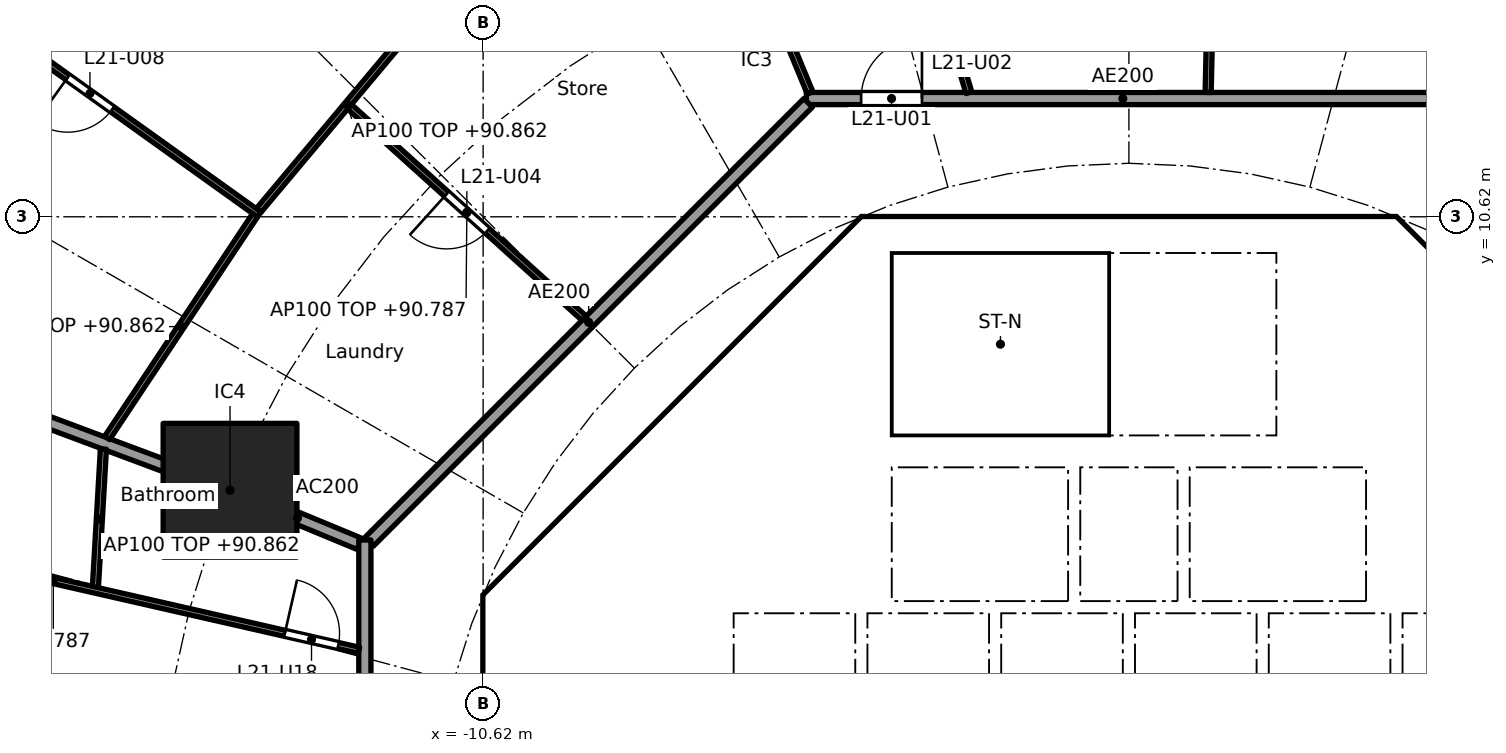
"""IFC4 building model, lengths in metres.
Left out: names, types, materials, properties, quantities, classifications, styles, units other than length and angle.
Written with IfcOpenShell. Run it as: python <this file> out.ifc"""

import sys

from ifc_helpers import new_model, si_unit, direction, frame, frame_2d, origin, origin_2d, place, context, subcontext, project, spatial, polyline, rectangle, outline, extrude, element, fill, save


model = new_model("IFC4")
c1 = context("Model", 3, precision=1e-05, world=origin(), true_north=direction((0.0, 1.0)))
c2 = subcontext(c1, "Body", "Model", "MODEL_VIEW")
j1 = project(units=[si_unit("LENGTHUNIT", "METRE"), si_unit("PLANEANGLEUNIT", "RADIAN")], contexts=[c1])
p1 = place(None, origin())
s1 = spatial("IfcSite", under=j1, at=p1, CompositionType="ELEMENT")
p2 = place(p1, origin())
s2 = spatial("IfcBuilding", under=s1, at=p2, CompositionType="ELEMENT")
p3 = place(p2, frame((0.0, 0.0, 88.1)))
s3 = spatial("IfcBuildingStorey", under=s2, at=p3, CompositionType="ELEMENT", Elevation=88.1)
p4 = place(p3, frame((-14.782, 6.123, 0.0), z_axis=(0.0, 0.0, 1.0), x_axis=(1.0, 0.0, 0.0)))
e1 = element("IfcColumn", 1, at=p4, inside=s3, PredefinedType="COLUMN", context=c2, shape_type="SweptSolid", body=[
    extrude(rectangle(XDim=2.2, YDim=2.2, at=origin_2d()), origin(), (0.0, 0.0, 1.0), 3.7),
])
p5 = place(p3, frame((9.988, 4.613, 0.0), z_axis=(0.0, 0.0, 1.0), x_axis=(-0.707106781187, 0.707106781187, 0.0)))
e2 = element("IfcWall", 2, at=p5, inside=s3, PredefinedType="SHEAR", context=c2, shape_type="SweptSolid", body=[
    extrude(rectangle(XDim=7.602, YDim=0.6, at=frame_2d((3.801, 0.0))), origin(), (0.0, 0.0, 1.0), 3.44),
])
p6 = place(p5, frame((3.201, 0.0, 0.0)))
e3 = element("IfcOpeningElement", 3, at=p6, cuts=e2, PredefinedType="OPENING", context=c2, shape_type="SweptSolid", body=[
    extrude(rectangle(XDim=1.2, YDim=2.1, at=frame_2d((0.6, 1.05))), frame((0.0, 0.31, 0.0), z_axis=(0.0, -1.0, 0.0), x_axis=(1.0, 0.0, 0.0)), (0.0, 0.0, 1.0), 0.62),
])
p7 = place(p3, frame((-4.613, 9.988, 0.0), z_axis=(0.0, 0.0, 1.0), x_axis=(-0.707106781187, -0.707106781187, 0.0)))
e4 = element("IfcWall", 4, at=p7, inside=s3, PredefinedType="SHEAR", context=c2, shape_type="SweptSolid", body=[
    extrude(rectangle(XDim=7.602, YDim=0.6, at=frame_2d((3.801, 0.0))), origin(), (0.0, 0.0, 1.0), 3.44),
])
p8 = place(p7, frame((0.351, 0.0, 0.0)))
e5 = element("IfcOpeningElement", 5, at=p8, cuts=e4, PredefinedType="OPENING", context=c2, shape_type="SweptSolid", body=[
    extrude(rectangle(XDim=1.1, YDim=2.1, at=frame_2d((0.55, 1.05))), frame((0.0, 0.31, 0.0), z_axis=(0.0, -1.0, 0.0), x_axis=(1.0, 0.0, 0.0)), (0.0, 0.0, 1.0), 0.62),
])
p9 = place(p3, frame((-10.325, 3.801, 0.0), z_axis=(0.0, 0.0, 1.0), x_axis=(0.0, -1.0, 0.0)))
e6 = element("IfcWall", 6, at=p9, inside=s3, PredefinedType="SHEAR", context=c2, shape_type="SweptSolid", body=[
    extrude(rectangle(XDim=7.602, YDim=0.6, at=frame_2d((3.801, 0.0))), origin(), (0.0, 0.0, 1.0), 3.44),
])
p10 = place(p9, frame((0.651, 0.0, 0.0)))
e7 = element("IfcOpeningElement", 7, at=p10, cuts=e6, PredefinedType="OPENING", context=c2, shape_type="SweptSolid", body=[
    extrude(rectangle(XDim=1.5, YDim=2.1, at=frame_2d((0.75, 1.05))), frame((0.0, 0.31, 0.0), z_axis=(0.0, -1.0, 0.0), x_axis=(1.0, 0.0, 0.0)), (0.0, 0.0, 1.0), 0.62),
])
p11 = place(p9, frame((5.451, 0.0, 0.0)))
e8 = element("IfcOpeningElement", 8, at=p11, cuts=e6, PredefinedType="OPENING", context=c2, shape_type="SweptSolid", body=[
    extrude(rectangle(XDim=1.5, YDim=2.1, at=frame_2d((0.75, 1.05))), frame((0.0, 0.31, 0.0), z_axis=(0.0, -1.0, 0.0), x_axis=(1.0, 0.0, 0.0)), (0.0, 0.0, 1.0), 0.62),
])
p12 = place(p3, frame((-5.8, 4.3, 0.0), z_axis=(0.0, 0.0, 1.0), x_axis=(0.0, 1.0, 0.0)))
e9 = element("IfcWall", 9, at=p12, inside=s3, PredefinedType="PARTITIONING", context=c2, shape_type="SweptSolid", body=[
    extrude(rectangle(XDim=3.927, YDim=0.15, at=frame_2d((1.963, 0.0))), origin(), (0.0, 0.0, 1.0), 3.44),
])
p13 = place(p12, frame((1.551, 0.0, 0.0)))
e10 = element("IfcOpeningElement", 10, at=p13, cuts=e9, PredefinedType="OPENING", context=c2, shape_type="SweptSolid", body=[
    extrude(rectangle(XDim=0.9, YDim=2.1, at=frame_2d((0.45, 1.05))), frame((0.0, 0.085, 0.0), z_axis=(0.0, -1.0, 0.0), x_axis=(1.0, 0.0, 0.0)), (0.0, 0.0, 1.0), 0.17),
])
p14 = place(p3, frame((4.0, 4.3, 0.0), z_axis=(0.0, 0.0, 1.0), x_axis=(0.0, 1.0, 0.0)))
e11 = element("IfcWall", 11, at=p14, inside=s3, PredefinedType="SOLIDWALL", context=c2, shape_type="SweptSolid", body=[
    extrude(rectangle(XDim=2.2, YDim=0.2, at=frame_2d((1.1, 0.0))), origin(), (0.0, 0.0, 1.0), 3.44),
])
p15 = place(p14, frame((0.55, 0.0, 0.0)))
e12 = element("IfcOpeningElement", 12, at=p15, cuts=e11, PredefinedType="OPENING", context=c2, shape_type="SweptSolid", body=[
    extrude(rectangle(XDim=1.1, YDim=2.1, at=frame_2d((0.55, 1.05))), frame((0.0, 0.11, 0.0), z_axis=(0.0, -1.0, 0.0), x_axis=(1.0, 0.0, 0.0)), (0.0, 0.0, 1.0), 0.22),
])
p16 = place(p3, frame((-4.0, 4.3, 0.0), z_axis=(0.0, 0.0, 1.0), x_axis=(0.0, 1.0, 0.0)))
e13 = element("IfcWall", 13, at=p16, inside=s3, PredefinedType="SOLIDWALL", context=c2, shape_type="SweptSolid", body=[
    extrude(rectangle(XDim=2.2, YDim=0.2, at=frame_2d((1.1, 0.0))), origin(), (0.0, 0.0, 1.0), 3.44),
])
p17 = place(p16, frame((0.55, 0.0, 0.0)))
e14 = element("IfcOpeningElement", 14, at=p17, cuts=e13, PredefinedType="OPENING", context=c2, shape_type="SweptSolid", body=[
    extrude(rectangle(XDim=1.1, YDim=2.1, at=frame_2d((0.55, 1.05))), frame((0.0, 0.11, 0.0), z_axis=(0.0, -1.0, 0.0), x_axis=(1.0, 0.0, 0.0)), (0.0, 0.0, 1.0), 0.22),
])
p18 = place(p3, frame((4.0, 7.025, 0.0), z_axis=(0.0, 0.0, 1.0), x_axis=(0.0, 1.0, 0.0)))
e15 = element("IfcWall", 15, at=p18, inside=s3, PredefinedType="SOLIDWALL", context=c2, shape_type="SweptSolid", body=[
    extrude(rectangle(XDim=3.0, YDim=0.2, at=frame_2d((1.5, 0.0))), origin(), (0.0, 0.0, 1.0), 3.44),
])
p19 = place(p18, frame((0.925, 0.0, 0.0)))
e16 = element("IfcOpeningElement", 16, at=p19, cuts=e15, PredefinedType="OPENING", context=c2, shape_type="SweptSolid", body=[
    extrude(rectangle(XDim=1.1, YDim=2.1, at=frame_2d((0.55, 1.05))), frame((0.0, 0.11, 0.0), z_axis=(0.0, -1.0, 0.0), x_axis=(1.0, 0.0, 0.0)), (0.0, 0.0, 1.0), 0.22),
])
p20 = place(p3, origin())
e17 = element("IfcWall", 17, at=p20, inside=s3, PredefinedType="SHEAR", context=c2, shape_type="SweptSolid", body=[
    extrude(outline(polyline([(-10.2, 4.825), (-9.776, 4.401), (-10.025, 4.152), (-10.025, 3.801), (-10.625, 3.801), (-10.625, 4.401), (-10.2, 4.825)])), origin(), (0.0, 0.0, 1.0), 3.44),
])
p21 = place(p3, origin())
e18 = element("IfcWall", 18, at=p21, inside=s3, PredefinedType="SHEAR", context=c2, shape_type="SweptSolid", body=[
    extrude(outline(polyline([(-4.152, 10.025), (-4.401, 9.776), (-4.825, 10.2), (-4.401, 10.625), (4.401, 10.625), (4.825, 10.2), (4.401, 9.776), (4.152, 10.025), (-4.152, 10.025)])), origin(), (0.0, 0.0, 1.0), 3.44),
])
for number, where, z_axis, x_axis in (
    (19, (-0.9, 4.3, 0.0), (0.0, 0.0, 1.0), (0.0, 1.0, 0.0)),
    (20, (0.9, 4.3, 0.0), (0.0, 0.0, 1.0), (0.0, 1.0, 0.0)),
):
    element("IfcWall", number, at=place(p3, frame(where, z_axis=z_axis, x_axis=x_axis)), inside=s3, PredefinedType="SOLIDWALL", context=c2, shape_type="SweptSolid", body=[
        extrude(rectangle(XDim=2.2, YDim=0.2, at=frame_2d((1.1, 0.0))), origin(), (0.0, 0.0, 1.0), 3.44),
    ])
p22 = place(p3, origin())
e21 = element("IfcWall", 21, at=p22, inside=s3, PredefinedType="SOLIDWALL", context=c2, shape_type="SweptSolid", body=[
    extrude(outline(polyline([(-6.5, 2.1), (-6.7, 2.1), (-6.7, 4.3), (6.7, 4.3), (6.7, 2.1), (6.5, 2.1), (6.5, 4.1), (4.5, 4.1), (4.5, 2.1), (4.3, 2.1), (4.3, 4.1), (2.3, 4.1), (2.3, 2.1), (2.1, 2.1), (2.1, 4.1), (0.1, 4.1), (0.1, 2.1), (-0.1, 2.1), (-0.1, 4.1), (-2.1, 4.1), (-2.1, 2.1), (-2.3, 2.1), (-2.3, 4.1), (-4.3, 4.1), (-4.3, 2.1), (-4.5, 2.1), (-4.5, 4.1), (-6.5, 4.1), (-6.5, 2.1)])), origin(), (0.0, 0.0, 1.0), 3.44),
])
p23 = place(p3, frame((-10.025, 4.0, 0.0), z_axis=(0.0, 0.0, 1.0), x_axis=(1.0, 0.0, 0.0)))
e22 = element("IfcWall", 22, at=p23, inside=s3, PredefinedType="PARTITIONING", context=c2, shape_type="SweptSolid", body=[
    extrude(rectangle(XDim=3.325, YDim=0.2, at=frame_2d((1.662, 0.0))), origin(), (0.0, 0.0, 1.0), 3.44),
])
p24 = place(p3, origin())
e23 = element("IfcWall", 23, at=p24, inside=s3, PredefinedType="SOLIDWALL", context=c2, shape_type="SweptSolid", body=[
    extrude(outline(polyline([(-3.9, 7.025), (-4.1, 7.025), (-4.1, 10.025), (-3.9, 10.025), (-3.9, 7.025)])), origin(), (0.0, 0.0, 1.0), 3.44),
])
p25 = place(p3, origin())
e24 = element("IfcWall", 24, at=p25, inside=s3, PredefinedType="SOLIDWALL", context=c2, shape_type="SweptSolid", body=[
    extrude(outline(polyline([(4.1, 6.5), (-4.1, 6.5), (-4.1, 7.025), (4.1, 7.025), (4.1, 6.5)])), origin(), (0.0, 0.0, 1.0), 3.44),
])
p26 = place(p3, frame((-12.657, 5.243, 0.0), z_axis=(0.0, 0.0, 1.0), x_axis=(-0.923843626288, 0.382770106157, 0.0)))
e25 = element("IfcWall", 25, at=p26, inside=s3, PredefinedType="PARTITIONING", context=c2, shape_type="SweptSolid", body=[
    extrude(rectangle(XDim=2.199, YDim=0.2, at=frame_2d((1.1, 0.0))), origin(), (0.0, 0.0, 1.0), 3.44),
])
p27 = place(p3, frame((-14.829, 6.14, 0.0), z_axis=(0.0, 0.0, 1.0), x_axis=(-0.936597324342, 0.35040755134, 0.0)))
e26 = element("IfcWall", 26, at=p27, inside=s3, PredefinedType="PARTITIONING", context=c2, shape_type="SweptSolid", body=[
    extrude(rectangle(XDim=13.606, YDim=0.2, at=frame_2d((6.803, 0.0))), origin(), (0.0, 0.0, 1.0), 2.762),
])
p28 = place(p3, frame((5.104, 12.565, 0.0), z_axis=(0.0, 0.0, 1.0), x_axis=(-1.0, 0.0, 0.0)))
e27 = element("IfcWall", 27, at=p28, inside=s3, PredefinedType="PARTITIONING", context=c2, shape_type="SweptSolid", body=[
    extrude(rectangle(XDim=10.409, YDim=0.2, at=frame_2d((5.205, 0.0))), origin(), (0.0, 0.0, 1.0), 3.44),
])
p29 = place(p28, frame((8.508, 0.0, 0.0)))
e28 = element("IfcOpeningElement", 28, at=p29, cuts=e27, PredefinedType="OPENING", context=c2, shape_type="SweptSolid", body=[
    extrude(rectangle(XDim=1.0, YDim=2.1, at=frame_2d((0.5, 1.05))), frame((0.0, 0.11, 0.0), z_axis=(0.0, -1.0, 0.0), x_axis=(1.0, 0.0, 0.0)), (0.0, 0.0, 1.0), 0.22),
])
p30 = place(p3, frame((-5.275, 12.494, 0.0), z_axis=(0.0, 0.0, 1.0), x_axis=(-0.707106781187, -0.707106781187, 0.0)))
e29 = element("IfcWall", 29, at=p30, inside=s3, PredefinedType="PARTITIONING", context=c2, shape_type="SweptSolid", body=[
    extrude(rectangle(XDim=10.209, YDim=0.2, at=frame_2d((5.104, 0.0))), origin(), (0.0, 0.0, 1.0), 3.44),
])
p31 = place(p3, frame((-12.565, 5.304, 0.0), z_axis=(0.0, 0.0, 1.0), x_axis=(0.0, -1.0, 0.0)))
e30 = element("IfcWall", 30, at=p31, inside=s3, PredefinedType="PARTITIONING", context=c2, shape_type="SweptSolid", body=[
    extrude(rectangle(XDim=10.409, YDim=0.2, at=frame_2d((5.205, 0.0))), origin(), (0.0, 0.0, 1.0), 3.44),
])
p32 = place(p31, frame((3.07, 0.0, 0.0)))
e31 = element("IfcOpeningElement", 31, at=p32, cuts=e30, PredefinedType="OPENING", context=c2, shape_type="SweptSolid", body=[
    extrude(rectangle(XDim=1.0, YDim=2.1, at=frame_2d((0.5, 1.05))), frame((0.0, 0.11, 0.0), z_axis=(0.0, -1.0, 0.0), x_axis=(1.0, 0.0, 0.0)), (0.0, 0.0, 1.0), 0.22),
])
p33 = place(p3, frame((1.303, 12.665, 0.0), z_axis=(0.0, 0.0, 1.0), x_axis=(0.022412244057, 0.999748814111, 0.0)))
e32 = element("IfcWall", 32, at=p33, inside=s3, PredefinedType="PARTITIONING", context=c2, shape_type="SweptSolid", body=[
    extrude(rectangle(XDim=13.203, YDim=0.1, at=frame_2d((6.601, 0.0))), origin(), (0.0, 0.0, 1.0), 2.687),
])
p34 = place(p33, frame((2.407, 0.0, 0.0)))
e33 = element("IfcOpeningElement", 33, at=p34, cuts=e32, PredefinedType="OPENING", context=c2, shape_type="SweptSolid", body=[
    extrude(rectangle(XDim=0.9, YDim=2.1, at=frame_2d((0.45, 1.05))), frame((0.0, 0.06, 0.0), z_axis=(0.0, -1.0, 0.0), x_axis=(1.0, 0.0, 0.0)), (0.0, 0.0, 1.0), 0.12),
])
p35 = place(p33, frame((9.009, 0.0, 0.0)))
e34 = element("IfcOpeningElement", 34, at=p35, cuts=e32, PredefinedType="OPENING", context=c2, shape_type="SweptSolid", body=[
    extrude(rectangle(XDim=0.9, YDim=2.1, at=frame_2d((0.45, 1.05))), frame((0.0, 0.06, 0.0), z_axis=(0.0, -1.0, 0.0), x_axis=(1.0, 0.0, 0.0)), (0.0, 0.0, 1.0), 0.12),
])
p36 = place(p3, frame((-2.631, 12.66, 0.0), z_axis=(0.0, 0.0, 1.0), x_axis=(-0.290161396499, 0.956977723869, 0.0)))
e35 = element("IfcWall", 35, at=p36, inside=s3, PredefinedType="PARTITIONING", context=c2, shape_type="SweptSolid", body=[
    extrude(rectangle(XDim=13.552, YDim=0.1, at=frame_2d((6.776, 0.0))), origin(), (0.0, 0.0, 1.0), 2.687),
])
p37 = place(p36, frame((0.772, 0.0, 0.0)))
e36 = element("IfcOpeningElement", 36, at=p37, cuts=e35, PredefinedType="OPENING", context=c2, shape_type="SweptSolid", body=[
    extrude(rectangle(XDim=0.9, YDim=2.1, at=frame_2d((0.45, 1.05))), frame((0.0, 0.06, 0.0), z_axis=(0.0, -1.0, 0.0), x_axis=(1.0, 0.0, 0.0)), (0.0, 0.0, 1.0), 0.12),
])
p38 = place(p36, frame((9.212, 0.0, 0.0)))
e37 = element("IfcOpeningElement", 37, at=p38, cuts=e35, PredefinedType="OPENING", context=c2, shape_type="SweptSolid", body=[
    extrude(rectangle(XDim=0.9, YDim=2.1, at=frame_2d((0.45, 1.05))), frame((0.0, 0.06, 0.0), z_axis=(0.0, -1.0, 0.0), x_axis=(1.0, 0.0, 0.0)), (0.0, 0.0, 1.0), 0.12),
])
p39 = place(p3, frame((-5.243, 12.657, 0.0), z_axis=(0.0, 0.0, 1.0), x_axis=(-0.382703272338, 0.923871314276, 0.0)))
e38 = element("IfcWall", 38, at=p39, inside=s3, PredefinedType="PARTITIONING", context=c2, shape_type="SweptSolid", body=[
    extrude(rectangle(XDim=2.249, YDim=0.1, at=frame_2d((1.125, 0.0))), origin(), (0.0, 0.0, 1.0), 3.44),
])
p40 = place(p3, frame((-11.396, 14.202, 0.0), z_axis=(0.0, 0.0, 1.0), x_axis=(-0.642483859922, -0.766299216847, 0.0)))
e39 = element("IfcWall", 39, at=p40, inside=s3, PredefinedType="PARTITIONING", context=c2, shape_type="SweptSolid", body=[
    extrude(rectangle(XDim=4.537, YDim=0.1, at=frame_2d((2.269, 0.0))), origin(), (0.0, 0.0, 1.0), 2.762),
])
p41 = place(p3, frame((-8.959, 8.952, 0.0), z_axis=(0.0, 0.0, 1.0), x_axis=(-0.742686144764, 0.669639672045, 0.0)))
e40 = element("IfcWall", 40, at=p41, inside=s3, PredefinedType="PARTITIONING", context=c2, shape_type="SweptSolid", body=[
    extrude(rectangle(XDim=5.194, YDim=0.1, at=frame_2d((2.597, 0.0))), origin(), (0.0, 0.0, 1.0), 2.687),
])
p42 = place(p41, frame((2.147, 0.0, 0.0)))
e41 = element("IfcOpeningElement", 41, at=p42, cuts=e40, PredefinedType="OPENING", context=c2, shape_type="SweptSolid", body=[
    extrude(rectangle(XDim=0.9, YDim=2.1, at=frame_2d((0.45, 1.05))), frame((0.0, 0.06, 0.0), z_axis=(0.0, -1.0, 0.0), x_axis=(1.0, 0.0, 0.0)), (0.0, 0.0, 1.0), 0.12),
])
p43 = place(p3, frame((-14.302, 10.657, 0.0), z_axis=(0.0, 0.0, 1.0), x_axis=(-0.813183002698, 0.582008079087, 0.0)))
e42 = element("IfcWall", 42, at=p43, inside=s3, PredefinedType="PARTITIONING", context=c2, shape_type="SweptSolid", body=[
    extrude(rectangle(XDim=13.074, YDim=0.1, at=frame_2d((6.537, 0.0))), origin(), (0.0, 0.0, 1.0), 2.762),
])
p44 = place(p43, frame((2.973, 0.0, 0.0)))
e43 = element("IfcOpeningElement", 43, at=p44, cuts=e42, PredefinedType="OPENING", context=c2, shape_type="SweptSolid", body=[
    extrude(rectangle(XDim=0.9, YDim=2.1, at=frame_2d((0.45, 1.05))), frame((0.0, 0.06, 0.0), z_axis=(0.0, -1.0, 0.0), x_axis=(1.0, 0.0, 0.0)), (0.0, 0.0, 1.0), 0.12),
])
p45 = place(p43, frame((9.485, 0.0, 0.0)))
e44 = element("IfcOpeningElement", 44, at=p45, cuts=e42, PredefinedType="OPENING", context=c2, shape_type="SweptSolid", body=[
    extrude(rectangle(XDim=0.9, YDim=2.1, at=frame_2d((0.45, 1.05))), frame((0.0, 0.06, 0.0), z_axis=(0.0, -1.0, 0.0), x_axis=(1.0, 0.0, 0.0)), (0.0, 0.0, 1.0), 0.12),
])
p46 = place(p3, frame((-14.371, 10.645, 0.0), z_axis=(0.0, 0.0, 1.0), x_axis=(-0.553341009285, -0.832954817168, 0.0)))
e45 = element("IfcWall", 45, at=p46, inside=s3, PredefinedType="PARTITIONING", context=c2, shape_type="SweptSolid", body=[
    extrude(rectangle(XDim=4.396, YDim=0.1, at=frame_2d((2.198, 0.0))), origin(), (0.0, 0.0, 1.0), 2.762),
])
p47 = place(p3, frame((-16.865, 6.8, 0.0), z_axis=(0.0, 0.0, 1.0), x_axis=(-0.057751176984, -0.998331008011, 0.0)))
e46 = element("IfcWall", 46, at=p47, inside=s3, PredefinedType="PARTITIONING", context=c2, shape_type="SweptSolid", body=[
    extrude(rectangle(XDim=2.3, YDim=0.1, at=frame_2d((1.15, 0.0))), origin(), (0.0, 0.0, 1.0), 2.762),
])
p48 = place(p3, frame((-12.662, 3.492, 0.0), z_axis=(0.0, 0.0, 1.0), x_axis=(-0.974981662956, 0.22228530518, 0.0)))
e47 = element("IfcWall", 47, at=p48, inside=s3, PredefinedType="PARTITIONING", context=c2, shape_type="SweptSolid", body=[
    extrude(rectangle(XDim=10.31, YDim=0.1, at=frame_2d((5.155, 0.0))), origin(), (0.0, 0.0, 1.0), 2.687),
])
p49 = place(p48, frame((0.35, 0.0, 0.0)))
e48 = element("IfcOpeningElement", 48, at=p49, cuts=e47, PredefinedType="OPENING", context=c2, shape_type="SweptSolid", body=[
    extrude(rectangle(XDim=0.9, YDim=2.1, at=frame_2d((0.45, 1.05))), frame((0.0, 0.06, 0.0), z_axis=(0.0, -1.0, 0.0), x_axis=(1.0, 0.0, 0.0)), (0.0, 0.0, 1.0), 0.12),
])
p50 = place(p48, frame((6.931, 0.0, 0.0)))
e49 = element("IfcOpeningElement", 49, at=p50, cuts=e47, PredefinedType="OPENING", context=c2, shape_type="SweptSolid", body=[
    extrude(rectangle(XDim=0.9, YDim=2.1, at=frame_2d((0.45, 1.05))), frame((0.0, 0.06, 0.0), z_axis=(0.0, -1.0, 0.0), x_axis=(1.0, 0.0, 0.0)), (0.0, 0.0, 1.0), 0.12),
])
p51 = place(p15, origin())
e50 = element("IfcDoor", 50, at=p51, inside=s3, OperationType="DOUBLE_DOOR_SLIDING", PredefinedType="DOOR", context=c2, shape_type="SweptSolid", body=[
    extrude(rectangle(XDim=1.1, YDim=2.1, at=frame_2d((0.55, 1.05))), frame((0.0, 0.025, 0.0), z_axis=(0.0, -1.0, 0.0), x_axis=(1.0, 0.0, 0.0)), (0.0, 0.0, 1.0), 0.05),
])
fill(e12, e50)
p52 = place(p17, origin())
e51 = element("IfcDoor", 51, at=p52, inside=s3, OperationType="DOUBLE_DOOR_SLIDING", PredefinedType="DOOR", context=c2, shape_type="SweptSolid", body=[
    extrude(rectangle(XDim=1.1, YDim=2.1, at=frame_2d((0.55, 1.05))), frame((0.0, 0.025, 0.0), z_axis=(0.0, -1.0, 0.0), x_axis=(1.0, 0.0, 0.0)), (0.0, 0.0, 1.0), 0.05),
])
fill(e14, e51)
p53 = place(p19, origin())
e52 = element("IfcDoor", 52, at=p53, inside=s3, OperationType="SINGLE_SWING_LEFT", PredefinedType="DOOR", context=c2, shape_type="SweptSolid", body=[
    extrude(rectangle(XDim=1.1, YDim=2.1, at=frame_2d((0.55, 1.05))), frame((0.0, 0.025, 0.0), z_axis=(0.0, -1.0, 0.0), x_axis=(1.0, 0.0, 0.0)), (0.0, 0.0, 1.0), 0.05),
])
fill(e16, e52)
p54 = place(p13, origin())
e53 = element("IfcDoor", 53, at=p54, inside=s3, OperationType="SINGLE_SWING_RIGHT", PredefinedType="DOOR", context=c2, shape_type="SweptSolid", body=[
    extrude(rectangle(XDim=0.9, YDim=2.1, at=frame_2d((0.45, 1.05))), frame((0.0, 0.025, 0.0), z_axis=(0.0, -1.0, 0.0), x_axis=(1.0, 0.0, 0.0)), (0.0, 0.0, 1.0), 0.05),
])
fill(e10, e53)
p55 = place(p10, origin())
e54 = element("IfcDoor", 54, at=p55, inside=s3, OperationType="DOUBLE_DOOR_SINGLE_SWING", PredefinedType="DOOR", context=c2, shape_type="SweptSolid", body=[
    extrude(rectangle(XDim=1.5, YDim=2.1, at=frame_2d((0.75, 1.05))), frame((0.0, 0.025, 0.0), z_axis=(0.0, -1.0, 0.0), x_axis=(1.0, 0.0, 0.0)), (0.0, 0.0, 1.0), 0.05),
])
fill(e7, e54)
p56 = place(p8, origin())
e55 = element("IfcDoor", 55, at=p56, inside=s3, OperationType="SINGLE_SWING_LEFT", PredefinedType="DOOR", context=c2, shape_type="SweptSolid", body=[
    extrude(rectangle(XDim=1.1, YDim=2.1, at=frame_2d((0.55, 1.05))), frame((0.0, 0.025, 0.0), z_axis=(0.0, -1.0, 0.0), x_axis=(1.0, 0.0, 0.0)), (0.0, 0.0, 1.0), 0.05),
])
fill(e5, e55)
p57 = place(p29, frame((1.0, 0.0, 0.0), x_axis=(-1.0, 0.0, 0.0)))
e56 = element("IfcDoor", 56, at=p57, inside=s3, OperationType="SINGLE_SWING_RIGHT", PredefinedType="DOOR", context=c2, shape_type="SweptSolid", body=[
    extrude(rectangle(XDim=1.0, YDim=2.1, at=frame_2d((0.5, 1.05))), frame((0.0, 0.025, 0.0), z_axis=(0.0, -1.0, 0.0), x_axis=(1.0, 0.0, 0.0)), (0.0, 0.0, 1.0), 0.05),
])
fill(e28, e56)
p58 = place(p42, origin())
e57 = element("IfcDoor", 57, at=p58, inside=s3, OperationType="SINGLE_SWING_RIGHT", PredefinedType="DOOR", context=c2, shape_type="SweptSolid", body=[
    extrude(rectangle(XDim=0.9, YDim=2.1, at=frame_2d((0.45, 1.05))), frame((0.0, 0.025, 0.0), z_axis=(0.0, -1.0, 0.0), x_axis=(1.0, 0.0, 0.0)), (0.0, 0.0, 1.0), 0.05),
])
fill(e41, e57)
p59 = place(p44, origin())
e58 = element("IfcDoor", 58, at=p59, inside=s3, OperationType="SINGLE_SWING_RIGHT", PredefinedType="DOOR", context=c2, shape_type="SweptSolid", body=[
    extrude(rectangle(XDim=0.9, YDim=2.1, at=frame_2d((0.45, 1.05))), frame((0.0, 0.025, 0.0), z_axis=(0.0, -1.0, 0.0), x_axis=(1.0, 0.0, 0.0)), (0.0, 0.0, 1.0), 0.05),
])
fill(e43, e58)
p60 = place(p49, frame((0.9, 0.0, 0.0), x_axis=(-1.0, 0.0, 0.0)))
e59 = element("IfcDoor", 59, at=p60, inside=s3, OperationType="SINGLE_SWING_LEFT", PredefinedType="DOOR", context=c2, shape_type="SweptSolid", body=[
    extrude(rectangle(XDim=0.9, YDim=2.1, at=frame_2d((0.45, 1.05))), frame((0.0, 0.025, 0.0), z_axis=(0.0, -1.0, 0.0), x_axis=(1.0, 0.0, 0.0)), (0.0, 0.0, 1.0), 0.05),
])
fill(e48, e59)
save(model, sys.argv[1])
